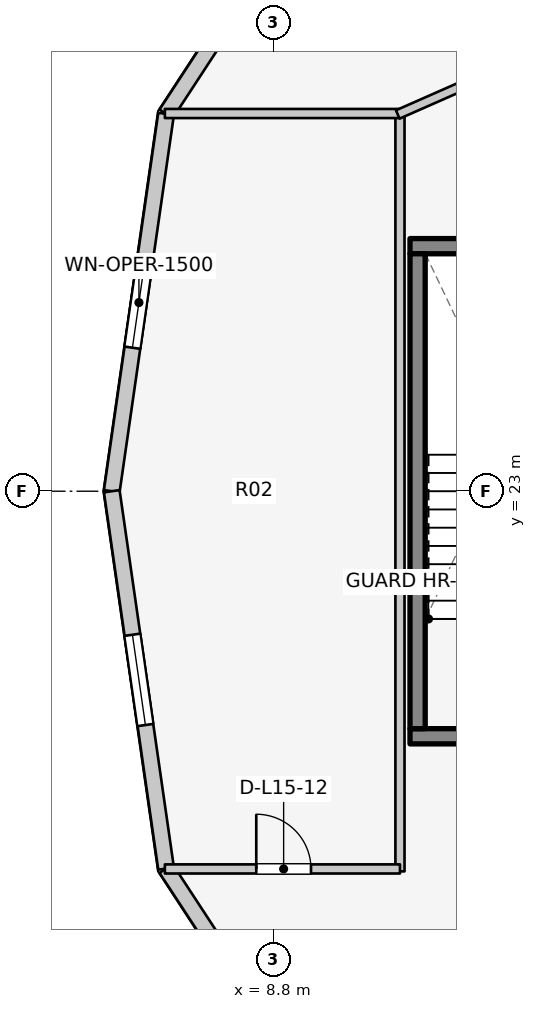
"""IFC4 building model, lengths in metres.
Left out: names, types, materials, properties, quantities, classifications, styles, units other than length and angle.
Written with IfcOpenShell. Run it as: python <this file> out.ifc"""

import sys

from ifc_helpers import new_model, si_unit, direction, frame, frame_2d, origin, place, context, subcontext, project, spatial, rectangle, extrude, element, fill, save


model = new_model("IFC4")
c1 = context("Model", 3, precision=1e-05, world=origin(), true_north=direction((0.0, 1.0)))
c2 = subcontext(c1, "Body", "Model", "MODEL_VIEW")
j1 = project(units=[si_unit("LENGTHUNIT", "METRE"), si_unit("PLANEANGLEUNIT", "RADIAN")], contexts=[c1])
p1 = place(None, origin())
s1 = spatial("IfcSite", under=j1, at=p1, CompositionType="ELEMENT")
p2 = place(p1, origin())
s2 = spatial("IfcBuilding", under=s1, at=p2, CompositionType="ELEMENT")
p3 = place(p2, frame((0.0, 0.0, 52.4)))
s3 = spatial("IfcBuildingStorey", under=s2, at=p3, CompositionType="ELEMENT", Elevation=52.4)
p4 = place(p3, frame((11.045, 18.97, 0.0), z_axis=(0.0, 0.0, 1.0), x_axis=(1.0, 0.0, 0.0)))
e1 = element("IfcWall", 1, at=p4, inside=s3, PredefinedType="SOLIDWALL", context=c2, shape_type="SweptSolid", body=[
    extrude(rectangle(XDim=3.782, YDim=0.25, at=frame_2d((1.891, 0.0))), origin(), (0.0, 0.0, 1.0), 3.1),
])
p5 = place(p4, frame((1.135, 0.0, 0.0)))
e2 = element("IfcOpeningElement", 2, at=p5, cuts=e1, PredefinedType="OPENING", context=c2, shape_type="SweptSolid", body=[
    extrude(rectangle(XDim=1.1, YDim=2.1, at=frame_2d((0.55, 1.05))), frame((0.0, 0.135, 0.0), z_axis=(0.0, -1.0, 0.0), x_axis=(1.0, 0.0, 0.0)), (0.0, 0.0, 1.0), 0.27),
])
p6 = place(p3, frame((11.045, 27.03, 0.0), z_axis=(0.0, 0.0, 1.0), x_axis=(1.0, 0.0, 0.0)))
e3 = element("IfcWall", 3, at=p6, inside=s3, PredefinedType="SOLIDWALL", context=c2, shape_type="SweptSolid", body=[
    extrude(rectangle(XDim=3.782, YDim=0.25, at=frame_2d((1.891, 0.0))), origin(), (0.0, 0.0, 1.0), 3.1),
])
p7 = place(p3, frame((11.17, 19.095, 0.0), z_axis=(0.0, 0.0, 1.0), x_axis=(0.0, 1.0, 0.0)))
e4 = element("IfcWall", 4, at=p7, inside=s3, PredefinedType="SOLIDWALL", context=c2, shape_type="SweptSolid", body=[
    extrude(rectangle(XDim=7.81, YDim=0.25, at=frame_2d((3.905, 0.0))), origin(), (0.0, 0.0, 1.0), 3.1),
])
p8 = place(p3, frame((9.806, 33.441, 0.0), z_axis=(0.0, 0.0, 1.0), x_axis=(-0.547702757047, -0.836672988642, 0.0)))
e5 = element("IfcWall", 5, at=p8, inside=s3, PredefinedType="STANDARD", context=c2, shape_type="SweptSolid", body=[
    extrude(rectangle(XDim=5.062, YDim=0.26, at=frame_2d((2.531, 0.0))), origin(), (0.0, 0.0, 1.0), 1.22),
])
p9 = place(p8, frame((1.931, 0.0, 0.15)))
e6 = element("IfcOpeningElement", 6, at=p9, cuts=e5, PredefinedType="OPENING", context=c2, shape_type="SweptSolid", body=[
    extrude(rectangle(XDim=1.2, YDim=0.9, at=frame_2d((0.6, 0.45))), frame((0.0, 0.14, 0.0), z_axis=(0.0, -1.0, 0.0), x_axis=(1.0, 0.0, 0.0)), (0.0, 0.0, 1.0), 0.28),
])
p10 = place(p3, frame((7.033, 29.205, 0.0), z_axis=(0.0, 0.0, 1.0), x_axis=(-0.142528001686, -0.989790770181, 0.0)))
e7 = element("IfcWall", 7, at=p10, inside=s3, PredefinedType="STANDARD", context=c2, shape_type="SweptSolid", body=[
    extrude(rectangle(XDim=6.269, YDim=0.26, at=frame_2d((3.135, 0.0))), origin(), (0.0, 0.0, 1.0), 2.57),
])
p11 = place(p10, frame((2.385, 0.0, 0.75)))
e8 = element("IfcOpeningElement", 8, at=p11, cuts=e7, PredefinedType="OPENING", context=c2, shape_type="SweptSolid", body=[
    extrude(rectangle(XDim=1.5, YDim=1.6, at=frame_2d((0.75, 0.8))), frame((0.0, 0.14, 0.0), z_axis=(0.0, -1.0, 0.0), x_axis=(1.0, 0.0, 0.0)), (0.0, 0.0, 1.0), 0.28),
])
p12 = place(p3, frame((6.14, 23.0, 0.0), z_axis=(0.0, 0.0, 1.0), x_axis=(0.142528001686, -0.989790770181, 0.0)))
e9 = element("IfcWall", 9, at=p12, inside=s3, PredefinedType="STANDARD", context=c2, shape_type="SweptSolid", body=[
    extrude(rectangle(XDim=6.269, YDim=0.26, at=frame_2d((3.135, 0.0))), origin(), (0.0, 0.0, 1.0), 2.57),
])
p13 = place(p12, frame((2.385, 0.0, 0.75)))
e10 = element("IfcOpeningElement", 10, at=p13, cuts=e9, PredefinedType="OPENING", context=c2, shape_type="SweptSolid", body=[
    extrude(rectangle(XDim=1.5, YDim=1.6, at=frame_2d((0.75, 0.8))), frame((0.0, 0.14, 0.0), z_axis=(0.0, -1.0, 0.0), x_axis=(1.0, 0.0, 0.0)), (0.0, 0.0, 1.0), 0.28),
])
p14 = place(p3, frame((7.033, 16.795, 0.0), z_axis=(0.0, 0.0, 1.0), x_axis=(0.547702757047, -0.836672988642, 0.0)))
e11 = element("IfcWall", 11, at=p14, inside=s3, PredefinedType="STANDARD", context=c2, shape_type="SweptSolid", body=[
    extrude(rectangle(XDim=5.062, YDim=0.26, at=frame_2d((2.531, 0.0))), origin(), (0.0, 0.0, 1.0), 1.22),
])
p15 = place(p14, frame((1.931, 0.0, 0.15)))
e12 = element("IfcOpeningElement", 12, at=p15, cuts=e11, PredefinedType="OPENING", context=c2, shape_type="SweptSolid", body=[
    extrude(rectangle(XDim=1.2, YDim=0.9, at=frame_2d((0.6, 0.45))), frame((0.0, 0.14, 0.0), z_axis=(0.0, -1.0, 0.0), x_axis=(1.0, 0.0, 0.0)), (0.0, 0.0, 1.0), 0.28),
])
p16 = place(p3, frame((10.88, 16.748, 0.0), z_axis=(0.0, 0.0, 1.0), x_axis=(0.0, 1.0, 0.0)))
e13 = element("IfcWall", 13, at=p16, inside=s3, PredefinedType="PARTITIONING", context=c2, shape_type="SweptSolid", body=[
    extrude(rectangle(XDim=12.503, YDim=0.15, at=frame_2d((6.252, 0.0))), origin(), (0.0, 0.0, 1.0), 2.12),
])
p17 = place(p3, frame((7.014, 16.788, 0.0), z_axis=(0.0, 0.0, 1.0), x_axis=(1.0, 0.0, 0.0)))
e14 = element("IfcWall", 14, at=p17, inside=s3, PredefinedType="PARTITIONING", context=c2, shape_type="SweptSolid", body=[
    extrude(rectangle(XDim=3.866, YDim=0.15, at=frame_2d((1.933, 0.0))), origin(), (0.0, 0.0, 1.0), 2.575),
])
p18 = place(p17, frame((1.503, 0.0, 0.0)))
e15 = element("IfcOpeningElement", 15, at=p18, cuts=e14, PredefinedType="OPENING", context=c2, shape_type="SweptSolid", body=[
    extrude(rectangle(XDim=0.9, YDim=2.1, at=frame_2d((0.45, 1.05))), frame((0.0, 0.085, 0.0), z_axis=(0.0, -1.0, 0.0), x_axis=(1.0, 0.0, 0.0)), (0.0, 0.0, 1.0), 0.17),
])
p19 = place(p3, frame((7.014, 29.212, 0.0), z_axis=(0.0, 0.0, 1.0), x_axis=(1.0, 0.0, 0.0)))
e16 = element("IfcWall", 16, at=p19, inside=s3, PredefinedType="PARTITIONING", context=c2, shape_type="SweptSolid", body=[
    extrude(rectangle(XDim=3.866, YDim=0.15, at=frame_2d((1.933, 0.0))), origin(), (0.0, 0.0, 1.0), 2.575),
])
p20 = place(p3, frame((10.844, 29.196, 0.0), z_axis=(0.0, 0.0, 1.0), x_axis=(0.91502756289, 0.403391322604, 0.0)))
e17 = element("IfcWall", 17, at=p20, inside=s3, PredefinedType="PARTITIONING", context=c2, shape_type="SweptSolid", body=[
    extrude(rectangle(XDim=4.637, YDim=0.15, at=frame_2d((2.319, 0.0))), origin(), (0.0, 0.0, 1.0), 1.22),
])
p21 = place(p11, origin())
e18 = element("IfcWindow", 18, at=p21, inside=s3, PartitioningType="SINGLE_PANEL", PredefinedType="WINDOW", context=c2, shape_type="SweptSolid", body=[
    extrude(rectangle(XDim=1.5, YDim=1.6, at=frame_2d((0.75, 0.8))), frame((0.0, 0.03, 0.0), z_axis=(0.0, -1.0, 0.0), x_axis=(1.0, 0.0, 0.0)), (0.0, 0.0, 1.0), 0.06),
])
fill(e8, e18)
p22 = place(p13, origin())
e19 = element("IfcWindow", 19, at=p22, inside=s3, PartitioningType="SINGLE_PANEL", PredefinedType="WINDOW", context=c2, shape_type="SweptSolid", body=[
    extrude(rectangle(XDim=1.5, YDim=1.6, at=frame_2d((0.75, 0.8))), frame((0.0, 0.03, 0.0), z_axis=(0.0, -1.0, 0.0), x_axis=(1.0, 0.0, 0.0)), (0.0, 0.0, 1.0), 0.06),
])
fill(e10, e19)
p23 = place(p18, origin())
e20 = element("IfcDoor", 20, at=p23, inside=s3, OperationType="SINGLE_SWING_LEFT", PredefinedType="DOOR", context=c2, shape_type="SweptSolid", body=[
    extrude(rectangle(XDim=0.9, YDim=2.1, at=frame_2d((0.45, 1.05))), frame((0.0, 0.025, 0.0), z_axis=(0.0, -1.0, 0.0), x_axis=(1.0, 0.0, 0.0)), (0.0, 0.0, 1.0), 0.05),
])
fill(e15, e20)
save(model, sys.argv[1])
